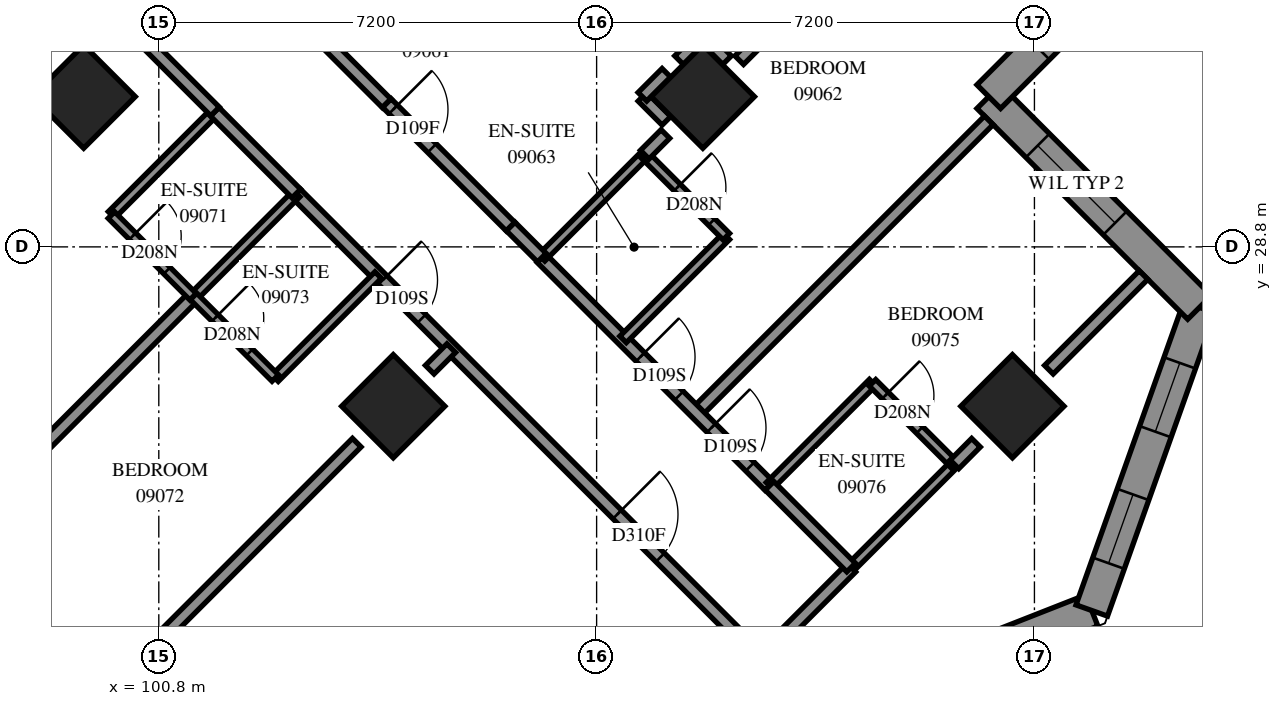
"""IFC4 building model, lengths in metres.
Left out: names, types, materials, properties, quantities, classifications, styles, units other than length and angle.
Written with IfcOpenShell. Run it as: python <this file> out.ifc"""

import sys

from ifc_helpers import new_model, si_unit, direction, frame, frame_2d, origin, origin_2d, place, context, subcontext, project, spatial, polyline, rectangle, outline, extrude, element, fill, save


model = new_model("IFC4")
c1 = context("Model", 3, precision=1e-05, world=origin(), true_north=direction((0.0, 1.0)))
c2 = subcontext(c1, "Body", "Model", "MODEL_VIEW")
j1 = project(units=[si_unit("LENGTHUNIT", "METRE"), si_unit("PLANEANGLEUNIT", "RADIAN")], contexts=[c1])
p1 = place(None, origin())
s1 = spatial("IfcSite", under=j1, at=p1, CompositionType="ELEMENT")
p2 = place(p1, origin())
s2 = spatial("IfcBuilding", under=s1, at=p2, CompositionType="ELEMENT")
p3 = place(p2, frame((0.0, 0.0, 37.2)))
s3 = spatial("IfcBuildingStorey", under=s2, at=p3, CompositionType="ELEMENT", Elevation=37.2)
for number, where, z_axis, x_axis in (
    (1, (99.565, 31.271, 0.0), (0.0, 0.0, 1.0), (0.707, -0.707, 0.0)),
    (2, (109.747, 31.271, 0.0), (0.0, 0.0, 1.0), (0.707, -0.707, 0.0)),
    (3, (104.656, 26.18, 0.0), (0.0, 0.0, 1.0), (0.707, -0.707, 0.0)),
    (4, (114.838, 26.18, 0.0), (0.0, 0.0, 1.0), (0.707, -0.707, 0.0)),
):
    element("IfcColumn", number, at=place(p3, frame(where, z_axis=z_axis, x_axis=x_axis)), inside=s3, PredefinedType="COLUMN", context=c2, shape_type="SweptSolid", body=[
        extrude(rectangle(XDim=1.2, YDim=1.2, at=origin_2d()), origin(), (0.0, 0.0, 1.0), 3.1),
    ])
p4 = place(p3, frame((111.023, 20.809, 0.0), z_axis=(0.0, 0.0, 1.0), x_axis=(0.9307322689, 0.3657013038, 0.0)))
e5 = element("IfcWall", 5, at=p4, inside=s3, PredefinedType="SOLIDWALL", context=c2, shape_type="SweptSolid", body=[
    extrude(outline(polyline([(0.12, -0.275), (5.626, -0.275), (5.376, 0.275), (-0.12, 0.275), (0.12, -0.275)])), origin(), (0.0, 0.0, 1.0), 3.1),
])
p5 = place(p4, frame((1.154, 0.0, 0.5)))
e6 = element("IfcOpeningElement", 6, at=p5, cuts=e5, PredefinedType="OPENING", context=c2, shape_type="SweptSolid", body=[
    extrude(rectangle(XDim=2.8, YDim=2.45, at=frame_2d((1.4, 1.225))), frame((0.0, 0.285, 0.0), z_axis=(0.0, -1.0, 0.0), x_axis=(1.0, 0.0, 0.0)), (0.0, 0.0, 1.0), 0.57),
])
p6 = place(p3, frame((116.143, 22.82, 0.0), z_axis=(0.0, 0.0, 1.0), x_axis=(0.334975732, 0.9422267556, 0.0)))
e7 = element("IfcWall", 7, at=p6, inside=s3, PredefinedType="SOLIDWALL", context=c2, shape_type="SweptSolid", body=[
    extrude(outline(polyline([(-0.125, -0.275), (5.464, -0.275), (5.117, 0.275), (0.125, 0.275), (-0.125, -0.275)])), origin(), (0.0, 0.0, 1.0), 3.1),
])
p7 = place(p6, frame((0.825, 0.0, 0.5)))
e8 = element("IfcOpeningElement", 8, at=p7, cuts=e7, PredefinedType="OPENING", context=c2, shape_type="SweptSolid", body=[
    extrude(rectangle(XDim=1.2, YDim=2.45, at=frame_2d((0.6, 1.225))), frame((0.0, 0.285, 0.0), z_axis=(0.0, -1.0, 0.0), x_axis=(1.0, 0.0, 0.0)), (0.0, 0.0, 1.0), 0.57),
])
p8 = place(p6, frame((3.121, 0.0, 0.5)))
e9 = element("IfcOpeningElement", 9, at=p8, cuts=e7, PredefinedType="OPENING", context=c2, shape_type="SweptSolid", body=[
    extrude(rectangle(XDim=1.2, YDim=2.45, at=frame_2d((0.6, 1.225))), frame((0.0, 0.285, 0.0), z_axis=(0.0, -1.0, 0.0), x_axis=(1.0, 0.0, 0.0)), (0.0, 0.0, 1.0), 0.57),
])
p9 = place(p3, frame((117.915, 27.805, 0.0), z_axis=(0.0, 0.0, 1.0), x_axis=(-0.7071067812, 0.7071067812, 0.0)))
e10 = element("IfcWall", 10, at=p9, inside=s3, PredefinedType="SOLIDWALL", context=c2, shape_type="SweptSolid", body=[
    extrude(outline(polyline([(-0.174, -0.275), (4.626, -0.275), (5.176, 0.275), (0.174, 0.275), (-0.174, -0.275)])), origin(), (0.0, 0.0, 1.0), 3.1),
])
p10 = place(p9, frame((1.964, 0.0, 0.6)))
e11 = element("IfcOpeningElement", 11, at=p10, cuts=e10, PredefinedType="OPENING", context=c2, shape_type="SweptSolid", body=[
    extrude(rectangle(XDim=1.8, YDim=1.9, at=frame_2d((0.9, 0.95))), frame((0.0, 0.285, 0.0), z_axis=(0.0, -1.0, 0.0), x_axis=(1.0, 0.0, 0.0)), (0.0, 0.0, 1.0), 0.57),
])
p11 = place(p3, frame((114.449, 31.271, 0.0), z_axis=(0.0, 0.0, 1.0), x_axis=(0.7070892384, 0.7071243236, 0.0)))
e12 = element("IfcWall", 12, at=p11, inside=s3, PredefinedType="SOLIDWALL", context=c2, shape_type="SweptSolid", body=[
    extrude(outline(polyline([(0.275, -0.275), (6.066, -0.275), (5.335, 0.275), (-0.275, 0.275), (0.275, -0.275)])), origin(), (0.0, 0.0, 1.0), 3.1),
])
p12 = place(p11, frame((1.137, 0.0, 0.6)))
e13 = element("IfcOpeningElement", 13, at=p12, cuts=e12, PredefinedType="OPENING", context=c2, shape_type="SweptSolid", body=[
    extrude(rectangle(XDim=1.8, YDim=1.9, at=frame_2d((0.9, 0.95))), frame((0.0, 0.285, 0.0), z_axis=(0.0, -1.0, 0.0), x_axis=(1.0, 0.0, 0.0)), (0.0, 0.0, 1.0), 0.57),
])
p13 = place(p3, frame((96.628, 22.718, 0.0), z_axis=(0.0, 0.0, 1.0), x_axis=(0.6325792241, -0.7744956586, 0.0)))
e14 = element("IfcWall", 14, at=p13, inside=s3, PredefinedType="SOLIDWALL", context=c2, shape_type="SweptSolid", body=[
    extrude(outline(polyline([(0.028, -0.275), (3.924, -0.275), (3.868, 0.275), (-0.028, 0.275), (0.028, -0.275)])), origin(), (0.0, 0.0, 1.0), 3.1),
])
p14 = place(p13, frame((0.323, 0.0, 0.5)))
e15 = element("IfcOpeningElement", 15, at=p14, cuts=e14, PredefinedType="OPENING", context=c2, shape_type="SweptSolid", body=[
    extrude(rectangle(XDim=2.8, YDim=2.45, at=frame_2d((1.4, 1.225))), frame((0.0, 0.285, 0.0), z_axis=(0.0, -1.0, 0.0), x_axis=(1.0, 0.0, 0.0)), (0.0, 0.0, 1.0), 0.57),
])
p15 = place(p3, frame((103.061, 29.677, 0.0), z_axis=(0.0, 0.0, 1.0), x_axis=(0.7071067812, -0.7071067812, 0.0)))
e16 = element("IfcWall", 16, at=p15, inside=s3, PredefinedType="PARTITIONING", context=c2, shape_type="SweptSolid", body=[
    extrude(rectangle(XDim=10.802, YDim=0.2, at=frame_2d((5.401, 0.0))), origin(), (0.0, 0.0, 1.0), 3.1),
])
p16 = place(p15, frame((2.012, 0.0, 0.0)))
e17 = element("IfcOpeningElement", 17, at=p16, cuts=e16, PredefinedType="OPENING", context=c2, shape_type="SweptSolid", body=[
    extrude(rectangle(XDim=0.9, YDim=2.1, at=frame_2d((0.45, 1.05))), frame((0.0, 0.11, 0.0), z_axis=(0.0, -1.0, 0.0), x_axis=(1.0, 0.0, 0.0)), (0.0, 0.0, 1.0), 0.22),
])
p17 = place(p15, frame((7.463, 0.0, 0.0)))
e18 = element("IfcOpeningElement", 18, at=p17, cuts=e16, PredefinedType="OPENING", context=c2, shape_type="SweptSolid", body=[
    extrude(rectangle(XDim=1.0, YDim=2.1, at=frame_2d((0.5, 1.05))), frame((0.0, 0.11, 0.0), z_axis=(0.0, -1.0, 0.0), x_axis=(1.0, 0.0, 0.0)), (0.0, 0.0, 1.0), 0.22),
])
p18 = place(p3, frame((99.455, 36.253, 0.0), z_axis=(0.0, 0.0, 1.0), x_axis=(0.7071067812, -0.7071067812, 0.0)))
e19 = element("IfcWall", 19, at=p18, inside=s3, PredefinedType="PARTITIONING", context=c2, shape_type="SweptSolid", body=[
    extrude(rectangle(XDim=7.201, YDim=0.2, at=frame_2d((3.601, 0.0))), origin(), (0.0, 0.0, 1.0), 3.1),
])
p19 = place(p18, frame((0.401, 0.0, 0.0)))
e20 = element("IfcOpeningElement", 20, at=p19, cuts=e19, PredefinedType="OPENING", context=c2, shape_type="SweptSolid", body=[
    extrude(rectangle(XDim=0.9, YDim=2.1, at=frame_2d((0.45, 1.05))), frame((0.0, 0.11, 0.0), z_axis=(0.0, -1.0, 0.0), x_axis=(1.0, 0.0, 0.0)), (0.0, 0.0, 1.0), 0.22),
])
p20 = place(p3, frame((96.534, 23.151, 0.0), z_axis=(0.0, 0.0, 1.0), x_axis=(0.7071067812, 0.7071067812, 0.0)))
e21 = element("IfcWall", 21, at=p20, inside=s3, PredefinedType="PARTITIONING", context=c2, shape_type="SweptSolid", body=[
    extrude(rectangle(XDim=6.835, YDim=0.2, at=frame_2d((3.417, 0.0))), origin(), (0.0, 0.0, 1.0), 3.1),
])
p21 = place(p3, frame((109.64, 26.074, 0.0), z_axis=(0.0, 0.0, 1.0), x_axis=(0.7072538194, 0.7069597124, 0.0)))
e22 = element("IfcWall", 22, at=p21, inside=s3, PredefinedType="PARTITIONING", context=c2, shape_type="SweptSolid", body=[
    extrude(rectangle(XDim=6.8, YDim=0.2, at=frame_2d((3.4, 0.0))), origin(), (0.0, 0.0, 1.0), 3.1),
])
for number, where, z_axis, x_axis in (
    (23, (110.345, 31.871, 0.0), (0.0, 0.0, 1.0), (0.707, 0.707, 0.0)),
    (24, (100.163, 21.689, 0.0), (0.0, 0.0, 1.0), (0.707, 0.707, 0.0)),
):
    element("IfcWall", number, at=place(p3, frame(where, z_axis=z_axis, x_axis=x_axis)), inside=s3, PredefinedType="PARTITIONING", context=c2, shape_type="SweptSolid", body=[
        extrude(rectangle(XDim=5.504, YDim=0.2, at=frame_2d((2.752, 0.0))), origin(), (0.0, 0.0, 1.0), 3.1),
    ])
p22 = place(p3, frame((107.093, 28.615, 0.0), z_axis=(0.0, 0.0, 1.0), x_axis=(0.7072011313, -0.7070124185, 0.0)))
e25 = element("IfcWall", 25, at=p22, inside=s3, PredefinedType="PARTITIONING", context=c2, shape_type="SweptSolid", body=[
    extrude(rectangle(XDim=5.299, YDim=0.2, at=frame_2d((2.65, 0.0))), origin(), (0.0, 0.0, 1.0), 3.1),
])
p23 = place(p22, frame((2.299, 0.0, 0.0)))
e26 = element("IfcOpeningElement", 26, at=p23, cuts=e25, PredefinedType="OPENING", context=c2, shape_type="SweptSolid", body=[
    extrude(rectangle(XDim=0.9, YDim=2.1, at=frame_2d((0.45, 1.05))), frame((0.0, 0.11, 0.0), z_axis=(0.0, -1.0, 0.0), x_axis=(1.0, 0.0, 0.0)), (0.0, 0.0, 1.0), 0.22),
])
p24 = place(p22, frame((3.949, 0.0, 0.0)))
e27 = element("IfcOpeningElement", 27, at=p24, cuts=e25, PredefinedType="OPENING", context=c2, shape_type="SweptSolid", body=[
    extrude(rectangle(XDim=0.9, YDim=2.1, at=frame_2d((0.45, 1.05))), frame((0.0, 0.11, 0.0), z_axis=(0.0, -1.0, 0.0), x_axis=(1.0, 0.0, 0.0)), (0.0, 0.0, 1.0), 0.22),
])
p25 = place(p3, frame((104.551, 31.165, 0.0), z_axis=(0.0, 0.0, 1.0), x_axis=(0.7074545101, -0.7067588812, 0.0)))
e28 = element("IfcWall", 28, at=p25, inside=s3, PredefinedType="PARTITIONING", context=c2, shape_type="SweptSolid", body=[
    extrude(rectangle(XDim=2.875, YDim=0.2, at=frame_2d((1.438, 0.0))), origin(), (0.0, 0.0, 1.0), 3.1),
])
p26 = place(p25, frame((0.148, 0.0, 0.0)))
e29 = element("IfcOpeningElement", 29, at=p26, cuts=e28, PredefinedType="OPENING", context=c2, shape_type="SweptSolid", body=[
    extrude(rectangle(XDim=0.9, YDim=2.1, at=frame_2d((0.45, 1.05))), frame((0.0, 0.11, 0.0), z_axis=(0.0, -1.0, 0.0), x_axis=(1.0, 0.0, 0.0)), (0.0, 0.0, 1.0), 0.22),
])
p27 = place(p3, frame((100.023, 29.327, 0.0), z_axis=(0.0, 0.0, 1.0), x_axis=(0.7071067812, 0.7071067812, 0.0)))
e30 = element("IfcWall", 30, at=p27, inside=s3, PredefinedType="PARTITIONING", context=c2, shape_type="SweptSolid", body=[
    extrude(rectangle(XDim=2.401, YDim=0.15, at=frame_2d((1.201, 0.0))), origin(), (0.0, 0.0, 1.0), 3.1),
])
for number, where, z_axis, x_axis in (
    (31, (101.371, 27.979, 0.0), (0.0, 0.0, 1.0), (0.707, 0.708, 0.0)),
    (32, (108.435, 27.279, 0.0), (0.0, 0.0, 1.0), (0.708, 0.707, 0.0)),
):
    element("IfcWall", number, at=place(p3, frame(where, z_axis=z_axis, x_axis=x_axis)), inside=s3, PredefinedType="PARTITIONING", context=c2, shape_type="SweptSolid", body=[
        extrude(rectangle(XDim=2.4, YDim=0.15, at=frame_2d((1.2, 0.0))), origin(), (0.0, 0.0, 1.0), 3.1),
    ])
p28 = place(p3, frame((112.183, 23.531, 0.0), z_axis=(0.0, 0.0, 1.0), x_axis=(0.7075233388, 0.706689978, 0.0)))
e33 = element("IfcWall", 33, at=p28, inside=s3, PredefinedType="PARTITIONING", context=c2, shape_type="SweptSolid", body=[
    extrude(rectangle(XDim=2.4, YDim=0.15, at=frame_2d((1.2, 0.0))), origin(), (0.0, 0.0, 1.0), 2.6),
])
for number, where, z_axis, x_axis in (
    (34, (102.711, 26.641, 0.0), (0.0, 0.0, 1.0), (0.707, 0.707, 0.0)),
    (35, (107.095, 28.621, 0.0), (0.0, 0.0, 1.0), (0.707, 0.707, 0.0)),
    (36, (110.843, 24.873, 0.0), (0.0, 0.0, 1.0), (0.707, 0.707, 0.0)),
):
    element("IfcWall", number, at=place(p3, frame(where, z_axis=z_axis, x_axis=x_axis)), inside=s3, PredefinedType="PARTITIONING", context=c2, shape_type="SweptSolid", body=[
        extrude(rectangle(XDim=2.398, YDim=0.15, at=frame_2d((1.199, 0.0))), origin(), (0.0, 0.0, 1.0), 3.1),
    ])
p29 = place(p3, frame((115.438, 26.78, 0.0), z_axis=(0.0, 0.0, 1.0), x_axis=(0.7071067812, 0.7071067812, 0.0)))
e37 = element("IfcWall", 37, at=p29, inside=s3, PredefinedType="PARTITIONING", context=c2, shape_type="SweptSolid", body=[
    extrude(rectangle(XDim=2.201, YDim=0.2, at=frame_2d((1.101, 0.0))), origin(), (0.0, 0.0, 1.0), 3.1),
])
p30 = place(p3, frame((110.705, 22.039, 0.0), z_axis=(0.0, 0.0, 1.0), x_axis=(0.7066304548, 0.7075827869, 0.0)))
e38 = element("IfcWall", 38, at=p30, inside=s3, PredefinedType="PARTITIONING", context=c2, shape_type="SweptSolid", body=[
    extrude(rectangle(XDim=2.1, YDim=0.2, at=frame_2d((1.05, 0.0))), origin(), (0.0, 0.0, 1.0), 2.6),
])
p31 = place(p3, frame((100.021, 29.323, 0.0), z_axis=(0.0, 0.0, 1.0), x_axis=(0.7071067812, -0.7071067812, 0.0)))
e39 = element("IfcWall", 39, at=p31, inside=s3, PredefinedType="PARTITIONING", context=c2, shape_type="SweptSolid", body=[
    extrude(rectangle(XDim=1.901, YDim=0.15, at=frame_2d((0.95, 0.0))), origin(), (0.0, 0.0, 1.0), 3.1),
])
p32 = place(p31, frame((0.491, 0.0, 0.0)))
e40 = element("IfcOpeningElement", 40, at=p32, cuts=e39, PredefinedType="OPENING", context=c2, shape_type="SweptSolid", body=[
    extrude(rectangle(XDim=0.8, YDim=2.1, at=frame_2d((0.4, 1.05))), frame((0.0, 0.085, 0.0), z_axis=(0.0, -1.0, 0.0), x_axis=(1.0, 0.0, 0.0)), (0.0, 0.0, 1.0), 0.17),
])
p33 = place(p3, frame((108.789, 30.313, 0.0), z_axis=(0.0, 0.0, 1.0), x_axis=(0.7071067812, -0.7071067812, 0.0)))
e41 = element("IfcWall", 41, at=p33, inside=s3, PredefinedType="PARTITIONING", context=c2, shape_type="SweptSolid", body=[
    extrude(rectangle(XDim=1.901, YDim=0.15, at=frame_2d((0.95, 0.0))), origin(), (0.0, 0.0, 1.0), 3.1),
])
p34 = place(p33, frame((0.76, 0.0, 0.0)))
e42 = element("IfcOpeningElement", 42, at=p34, cuts=e41, PredefinedType="OPENING", context=c2, shape_type="SweptSolid", body=[
    extrude(rectangle(XDim=0.8, YDim=2.1, at=frame_2d((0.4, 1.05))), frame((0.0, 0.085, 0.0), z_axis=(0.0, -1.0, 0.0), x_axis=(1.0, 0.0, 0.0)), (0.0, 0.0, 1.0), 0.17),
])
p35 = place(p3, frame((112.537, 26.565, 0.0), z_axis=(0.0, 0.0, 1.0), x_axis=(0.7071067812, -0.7071067812, 0.0)))
e43 = element("IfcWall", 43, at=p35, inside=s3, PredefinedType="PARTITIONING", context=c2, shape_type="SweptSolid", body=[
    extrude(rectangle(XDim=1.901, YDim=0.15, at=frame_2d((0.95, 0.0))), origin(), (0.0, 0.0, 1.0), 3.1),
])
p36 = place(p35, frame((0.297, 0.0, 0.0)))
e44 = element("IfcOpeningElement", 44, at=p36, cuts=e43, PredefinedType="OPENING", context=c2, shape_type="SweptSolid", body=[
    extrude(rectangle(XDim=0.8, YDim=2.1, at=frame_2d((0.4, 1.05))), frame((0.0, 0.085, 0.0), z_axis=(0.0, -1.0, 0.0), x_axis=(1.0, 0.0, 0.0)), (0.0, 0.0, 1.0), 0.17),
])
p37 = place(p3, frame((110.843, 24.871, 0.0), z_axis=(0.0, 0.0, 1.0), x_axis=(0.7065800724, -0.7076330979, 0.0)))
e45 = element("IfcWall", 45, at=p37, inside=s3, PredefinedType="PARTITIONING", context=c2, shape_type="SweptSolid", body=[
    extrude(rectangle(XDim=1.899, YDim=0.2, at=frame_2d((0.95, 0.0))), origin(), (0.0, 0.0, 1.0), 3.1),
])
p38 = place(p3, frame((101.371, 27.985, 0.0), z_axis=(0.0, 0.0, 1.0), x_axis=(0.7076330979, -0.7065800724, 0.0)))
e46 = element("IfcWall", 46, at=p38, inside=s3, PredefinedType="PARTITIONING", context=c2, shape_type="SweptSolid", body=[
    extrude(rectangle(XDim=1.899, YDim=0.15, at=frame_2d((0.95, 0.0))), origin(), (0.0, 0.0, 1.0), 3.1),
])
p39 = place(p38, frame((0.501, 0.0, 0.0)))
e47 = element("IfcOpeningElement", 47, at=p39, cuts=e46, PredefinedType="OPENING", context=c2, shape_type="SweptSolid", body=[
    extrude(rectangle(XDim=0.8, YDim=2.1, at=frame_2d((0.4, 1.05))), frame((0.0, 0.085, 0.0), z_axis=(0.0, -1.0, 0.0), x_axis=(1.0, 0.0, 0.0)), (0.0, 0.0, 1.0), 0.17),
])
p40 = place(p3, frame((101.72, 31.022, 0.0), z_axis=(0.0, 0.0, 1.0), x_axis=(0.7065800724, -0.7076330979, 0.0)))
e48 = element("IfcWall", 48, at=p40, inside=s3, PredefinedType="PARTITIONING", context=c2, shape_type="SweptSolid", body=[
    extrude(rectangle(XDim=1.899, YDim=0.2, at=frame_2d((0.95, 0.0))), origin(), (0.0, 0.0, 1.0), 3.1),
])
p41 = place(p3, frame((100.523, 32.229, 0.0), z_axis=(0.0, 0.0, 1.0), x_axis=(0.7071067812, -0.7071067812, 0.0)))
e49 = element("IfcWall", 49, at=p41, inside=s3, PredefinedType="PARTITIONING", context=c2, shape_type="SweptSolid", body=[
    extrude(rectangle(XDim=1.7, YDim=0.2, at=frame_2d((0.85, 0.0))), origin(), (0.0, 0.0, 1.0), 3.1),
])
p42 = place(p3, frame((106.587, 29.135, 0.0), z_axis=(0.0, 0.0, 1.0), x_axis=(0.7071067812, -0.7071067812, 0.0)))
e50 = element("IfcWall", 50, at=p42, inside=s3, PredefinedType="PARTITIONING", context=c2, shape_type="SweptSolid", body=[
    extrude(rectangle(XDim=0.724, YDim=0.2, at=frame_2d((0.362, 0.0))), origin(), (0.0, 0.0, 1.0), 3.1),
])
for number, where, z_axis, x_axis in (
    (51, (108.754, 31.268, 0.0), (0.0, 0.0, 1.0), (0.707, -0.707, 0.0)),
    (52, (109.751, 32.265, 0.0), (0.0, 0.0, 1.0), (0.707, -0.707, 0.0)),
    (53, (109.355, 31.871, 0.0), (0.0, 0.0, 1.0), (0.707, 0.707, 0.0)),
    (54, (108.753, 31.269, 0.0), (0.0, 0.0, 1.0), (0.707, 0.707, 0.0)),
):
    element("IfcWall", number, at=place(p3, frame(where, z_axis=z_axis, x_axis=x_axis)), inside=s3, PredefinedType="PARTITIONING", context=c2, shape_type="SweptSolid", body=[
        extrude(rectangle(XDim=0.557, YDim=0.2, at=frame_2d((0.279, 0.0))), origin(), (0.0, 0.0, 1.0), 3.1),
    ])
p43 = place(p3, frame((113.885, 25.223, 0.0), z_axis=(0.0, 0.0, 1.0), x_axis=(0.7051121336, 0.709095818, 0.0)))
e55 = element("IfcWall", 55, at=p43, inside=s3, PredefinedType="PARTITIONING", context=c2, shape_type="SweptSolid", body=[
    extrude(rectangle(XDim=0.502, YDim=0.2, at=frame_2d((0.251, 0.0))), origin(), (0.0, 0.0, 1.0), 2.6),
])
p44 = place(p3, frame((105.255, 26.781, 0.0), z_axis=(0.0, 0.0, 1.0), x_axis=(0.7071067812, 0.7071067812, 0.0)))
e56 = element("IfcWall", 56, at=p44, inside=s3, PredefinedType="PARTITIONING", context=c2, shape_type="SweptSolid", body=[
    extrude(rectangle(XDim=0.501, YDim=0.2, at=frame_2d((0.25, 0.0))), origin(), (0.0, 0.0, 1.0), 3.1),
])
p45 = place(p3, frame((108.791, 30.317, 0.0), z_axis=(0.0, 0.0, 1.0), x_axis=(0.7071067812, 0.7071067812, 0.0)))
e57 = element("IfcWall", 57, at=p45, inside=s3, PredefinedType="PARTITIONING", context=c2, shape_type="SweptSolid", body=[
    extrude(rectangle(XDim=0.481, YDim=0.2, at=frame_2d((0.24, 0.0))), origin(), (0.0, 0.0, 1.0), 3.1),
])
p46 = place(p7, origin())
e58 = element("IfcWindow", 58, at=p46, inside=s3, PartitioningType="SINGLE_PANEL", PredefinedType="WINDOW", context=c2, shape_type="SweptSolid", body=[
    extrude(rectangle(XDim=1.2, YDim=2.45, at=frame_2d((0.6, 1.225))), frame((0.0, 0.155, 0.0), z_axis=(0.0, -1.0, 0.0), x_axis=(1.0, 0.0, 0.0)), (0.0, 0.0, 1.0), 0.06),
])
fill(e8, e58)
p47 = place(p8, origin())
e59 = element("IfcWindow", 59, at=p47, inside=s3, PartitioningType="SINGLE_PANEL", PredefinedType="WINDOW", context=c2, shape_type="SweptSolid", body=[
    extrude(rectangle(XDim=1.2, YDim=2.45, at=frame_2d((0.6, 1.225))), frame((0.0, 0.155, 0.0), z_axis=(0.0, -1.0, 0.0), x_axis=(1.0, 0.0, 0.0)), (0.0, 0.0, 1.0), 0.06),
])
fill(e9, e59)
p48 = place(p10, origin())
e60 = element("IfcWindow", 60, at=p48, inside=s3, PartitioningType="SINGLE_PANEL", PredefinedType="WINDOW", context=c2, shape_type="SweptSolid", body=[
    extrude(rectangle(XDim=1.8, YDim=1.9, at=frame_2d((0.9, 0.95))), frame((0.0, 0.155, 0.0), z_axis=(0.0, -1.0, 0.0), x_axis=(1.0, 0.0, 0.0)), (0.0, 0.0, 1.0), 0.06),
])
fill(e11, e60)
p49 = place(p26, origin())
e61 = element("IfcDoor", 61, at=p49, inside=s3, OperationType="SINGLE_SWING_LEFT", PredefinedType="DOOR", context=c2, shape_type="SweptSolid", body=[
    extrude(rectangle(XDim=0.9, YDim=2.1, at=frame_2d((0.45, 1.05))), frame((0.0, 0.025, 0.0), z_axis=(0.0, -1.0, 0.0), x_axis=(1.0, 0.0, 0.0)), (0.0, 0.0, 1.0), 0.05),
])
fill(e29, e61)
p50 = place(p23, origin())
e62 = element("IfcDoor", 62, at=p50, inside=s3, OperationType="SINGLE_SWING_LEFT", PredefinedType="DOOR", context=c2, shape_type="SweptSolid", body=[
    extrude(rectangle(XDim=0.9, YDim=2.1, at=frame_2d((0.45, 1.05))), frame((0.0, 0.025, 0.0), z_axis=(0.0, -1.0, 0.0), x_axis=(1.0, 0.0, 0.0)), (0.0, 0.0, 1.0), 0.05),
])
fill(e26, e62)
p51 = place(p34, origin())
e63 = element("IfcDoor", 63, at=p51, inside=s3, OperationType="SINGLE_SWING_RIGHT", PredefinedType="DOOR", context=c2, shape_type="SweptSolid", body=[
    extrude(rectangle(XDim=0.8, YDim=2.1, at=frame_2d((0.4, 1.05))), frame((0.0, 0.025, 0.0), z_axis=(0.0, -1.0, 0.0), x_axis=(1.0, 0.0, 0.0)), (0.0, 0.0, 1.0), 0.05),
])
fill(e42, e63)
p52 = place(p32, origin())
e64 = element("IfcDoor", 64, at=p52, inside=s3, OperationType="SINGLE_SWING_RIGHT", PredefinedType="DOOR", context=c2, shape_type="SweptSolid", body=[
    extrude(rectangle(XDim=0.8, YDim=2.1, at=frame_2d((0.4, 1.05))), frame((0.0, 0.025, 0.0), z_axis=(0.0, -1.0, 0.0), x_axis=(1.0, 0.0, 0.0)), (0.0, 0.0, 1.0), 0.05),
])
fill(e40, e64)
p53 = place(p16, origin())
e65 = element("IfcDoor", 65, at=p53, inside=s3, OperationType="SINGLE_SWING_LEFT", PredefinedType="DOOR", context=c2, shape_type="SweptSolid", body=[
    extrude(rectangle(XDim=0.9, YDim=2.1, at=frame_2d((0.45, 1.05))), frame((0.0, 0.025, 0.0), z_axis=(0.0, -1.0, 0.0), x_axis=(1.0, 0.0, 0.0)), (0.0, 0.0, 1.0), 0.05),
])
fill(e17, e65)
p54 = place(p39, origin())
e66 = element("IfcDoor", 66, at=p54, inside=s3, OperationType="SINGLE_SWING_RIGHT", PredefinedType="DOOR", context=c2, shape_type="SweptSolid", body=[
    extrude(rectangle(XDim=0.8, YDim=2.1, at=frame_2d((0.4, 1.05))), frame((0.0, 0.025, 0.0), z_axis=(0.0, -1.0, 0.0), x_axis=(1.0, 0.0, 0.0)), (0.0, 0.0, 1.0), 0.05),
])
fill(e47, e66)
p55 = place(p17, origin())
e67 = element("IfcDoor", 67, at=p55, inside=s3, OperationType="SINGLE_SWING_RIGHT", PredefinedType="DOOR", context=c2, shape_type="SweptSolid", body=[
    extrude(rectangle(XDim=1.0, YDim=2.1, at=frame_2d((0.5, 1.05))), frame((0.0, 0.025, 0.0), z_axis=(0.0, -1.0, 0.0), x_axis=(1.0, 0.0, 0.0)), (0.0, 0.0, 1.0), 0.05),
])
fill(e18, e67)
p56 = place(p24, origin())
e68 = element("IfcDoor", 68, at=p56, inside=s3, OperationType="SINGLE_SWING_RIGHT", PredefinedType="DOOR", context=c2, shape_type="SweptSolid", body=[
    extrude(rectangle(XDim=0.9, YDim=2.1, at=frame_2d((0.45, 1.05))), frame((0.0, 0.025, 0.0), z_axis=(0.0, -1.0, 0.0), x_axis=(1.0, 0.0, 0.0)), (0.0, 0.0, 1.0), 0.05),
])
fill(e27, e68)
p57 = place(p36, origin())
e69 = element("IfcDoor", 69, at=p57, inside=s3, OperationType="SINGLE_SWING_RIGHT", PredefinedType="DOOR", context=c2, shape_type="SweptSolid", body=[
    extrude(rectangle(XDim=0.8, YDim=2.1, at=frame_2d((0.4, 1.05))), frame((0.0, 0.025, 0.0), z_axis=(0.0, -1.0, 0.0), x_axis=(1.0, 0.0, 0.0)), (0.0, 0.0, 1.0), 0.05),
])
fill(e44, e69)
save(model, sys.argv[1])
